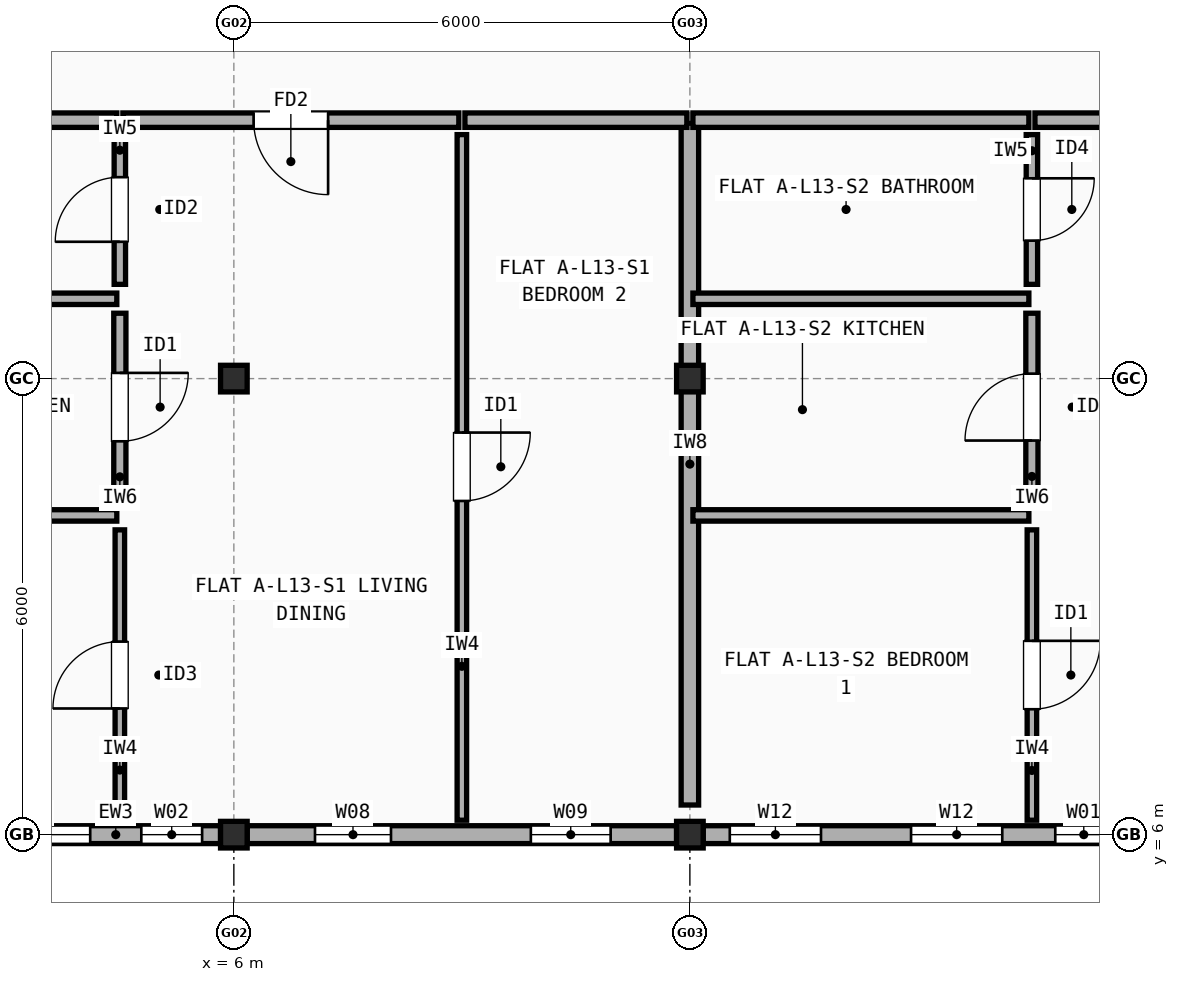
"""IFC4 building model, lengths in metres.
Left out: names, types, materials, properties, quantities, classifications, styles, units other than length and angle.
Written with IfcOpenShell. Run it as: python <this file> out.ifc"""

import sys

from ifc_helpers import new_model, si_unit, direction, frame, frame_2d, origin, origin_2d, place, context, subcontext, project, spatial, rectangle, extrude, element, fill, save


model = new_model("IFC4")
c1 = context("Model", 3, precision=1e-05, world=origin(), true_north=direction((0.0, 1.0)))
c2 = subcontext(c1, "Body", "Model", "MODEL_VIEW")
j1 = project(units=[si_unit("LENGTHUNIT", "METRE"), si_unit("PLANEANGLEUNIT", "RADIAN")], contexts=[c1])
p1 = place(None, origin())
s1 = spatial("IfcSite", under=j1, at=p1, CompositionType="ELEMENT")
p2 = place(p1, origin())
s2 = spatial("IfcBuilding", under=s1, at=p2, CompositionType="ELEMENT")
p3 = place(p2, frame((0.0, 0.0, 42.9)))
s3 = spatial("IfcBuildingStorey", under=s2, at=p3, CompositionType="ELEMENT", Elevation=42.9)
for number, where, z_axis, x_axis in (
    (1, (6.0, 6.0, 0.0), (0.0, 0.0, 1.0), (1.0, 0.0, 0.0)),
    (2, (6.0, 12.0, 0.0), (0.0, 0.0, 1.0), (1.0, 0.0, 0.0)),
    (3, (12.0, 6.0, 0.0), (0.0, 0.0, 1.0), (1.0, 0.0, 0.0)),
    (4, (12.0, 12.0, 0.0), (0.0, 0.0, 1.0), (1.0, 0.0, 0.0)),
):
    element("IfcColumn", number, at=place(p3, frame(where, z_axis=z_axis, x_axis=x_axis)), inside=s3, PredefinedType="COLUMN", context=c2, shape_type="SweptSolid", body=[
        extrude(rectangle(XDim=0.35, YDim=0.35, at=origin_2d()), origin(), (0.0, 0.0, 1.0), 3.005),
    ])
p4 = place(p3, frame((0.175, 6.0, 0.0), z_axis=(0.0, 0.0, 1.0), x_axis=(1.0, 0.0, 0.0)))
e5 = element("IfcWall", 5, at=p4, inside=s3, PredefinedType="STANDARD", context=c2, shape_type="SweptSolid", body=[
    extrude(rectangle(XDim=5.65, YDim=0.235, at=frame_2d((2.825, 0.0))), origin(), (0.0, 0.0, 1.0), 2.487),
])
p5 = place(p4, frame((0.35, 0.0, 0.9)))
e6 = element("IfcOpeningElement", 6, at=p5, cuts=e5, PredefinedType="OPENING", context=c2, shape_type="SweptSolid", body=[
    extrude(rectangle(XDim=1.5, YDim=1.4, at=frame_2d((0.75, 0.7))), frame((0.0, 0.127, 0.0), z_axis=(0.0, -1.0, 0.0), x_axis=(1.0, 0.0, 0.0)), (0.0, 0.0, 1.0), 0.255),
])
p6 = place(p4, frame((2.435, 0.0, 0.9)))
e7 = element("IfcOpeningElement", 7, at=p6, cuts=e5, PredefinedType="OPENING", context=c2, shape_type="SweptSolid", body=[
    extrude(rectangle(XDim=1.5, YDim=1.4, at=frame_2d((0.75, 0.7))), frame((0.0, 0.127, 0.0), z_axis=(0.0, -1.0, 0.0), x_axis=(1.0, 0.0, 0.0)), (0.0, 0.0, 1.0), 0.255),
])
p7 = place(p4, frame((4.607, 0.0, 0.9)))
e8 = element("IfcOpeningElement", 8, at=p7, cuts=e5, PredefinedType="OPENING", context=c2, shape_type="SweptSolid", body=[
    extrude(rectangle(XDim=0.8, YDim=1.2, at=frame_2d((0.4, 0.6))), frame((0.0, 0.127, 0.0), z_axis=(0.0, -1.0, 0.0), x_axis=(1.0, 0.0, 0.0)), (0.0, 0.0, 1.0), 0.255),
])
p8 = place(p3, frame((6.175, 6.0, 0.0), z_axis=(0.0, 0.0, 1.0), x_axis=(1.0, 0.0, 0.0)))
e9 = element("IfcWall", 9, at=p8, inside=s3, PredefinedType="STANDARD", context=c2, shape_type="SweptSolid", body=[
    extrude(rectangle(XDim=5.65, YDim=0.235, at=frame_2d((2.825, 0.0))), origin(), (0.0, 0.0, 1.0), 2.487),
])
p9 = place(p8, frame((0.893, 0.0, 0.9)))
e10 = element("IfcOpeningElement", 10, at=p9, cuts=e9, PredefinedType="OPENING", context=c2, shape_type="SweptSolid", body=[
    extrude(rectangle(XDim=1.0, YDim=1.4, at=frame_2d((0.5, 0.7))), frame((0.0, 0.127, 0.0), z_axis=(0.0, -1.0, 0.0), x_axis=(1.0, 0.0, 0.0)), (0.0, 0.0, 1.0), 0.255),
])
p10 = place(p8, frame((3.732, 0.0, 0.9)))
e11 = element("IfcOpeningElement", 11, at=p10, cuts=e9, PredefinedType="OPENING", context=c2, shape_type="SweptSolid", body=[
    extrude(rectangle(XDim=1.05, YDim=1.35, at=frame_2d((0.525, 0.675))), frame((0.0, 0.127, 0.0), z_axis=(0.0, -1.0, 0.0), x_axis=(1.0, 0.0, 0.0)), (0.0, 0.0, 1.0), 0.255),
])
p11 = place(p3, frame((12.175, 6.0, 0.0), z_axis=(0.0, 0.0, 1.0), x_axis=(1.0, 0.0, 0.0)))
e12 = element("IfcWall", 12, at=p11, inside=s3, PredefinedType="STANDARD", context=c2, shape_type="SweptSolid", body=[
    extrude(rectangle(XDim=5.65, YDim=0.235, at=frame_2d((2.825, 0.0))), origin(), (0.0, 0.0, 1.0), 2.487),
])
p12 = place(p11, frame((0.35, 0.0, 0.9)))
e13 = element("IfcOpeningElement", 13, at=p12, cuts=e12, PredefinedType="OPENING", context=c2, shape_type="SweptSolid", body=[
    extrude(rectangle(XDim=1.2, YDim=1.35, at=frame_2d((0.6, 0.675))), frame((0.0, 0.127, 0.0), z_axis=(0.0, -1.0, 0.0), x_axis=(1.0, 0.0, 0.0)), (0.0, 0.0, 1.0), 0.255),
])
p13 = place(p11, frame((2.735, 0.0, 0.9)))
e14 = element("IfcOpeningElement", 14, at=p13, cuts=e12, PredefinedType="OPENING", context=c2, shape_type="SweptSolid", body=[
    extrude(rectangle(XDim=1.2, YDim=1.35, at=frame_2d((0.6, 0.675))), frame((0.0, 0.127, 0.0), z_axis=(0.0, -1.0, 0.0), x_axis=(1.0, 0.0, 0.0)), (0.0, 0.0, 1.0), 0.255),
])
p14 = place(p11, frame((4.633, 0.0, 0.9)))
e15 = element("IfcOpeningElement", 15, at=p14, cuts=e12, PredefinedType="OPENING", context=c2, shape_type="SweptSolid", body=[
    extrude(rectangle(XDim=0.75, YDim=1.15, at=frame_2d((0.375, 0.575))), frame((0.0, 0.127, 0.0), z_axis=(0.0, -1.0, 0.0), x_axis=(1.0, 0.0, 0.0)), (0.0, 0.0, 1.0), 0.255),
])
p15 = place(p3, frame((12.0, 6.39, 0.0), z_axis=(0.0, 0.0, 1.0), x_axis=(0.0, 1.0, 0.0)))
e16 = element("IfcWall", 16, at=p15, inside=s3, PredefinedType="SOLIDWALL", context=c2, shape_type="SweptSolid", body=[
    extrude(rectangle(XDim=8.97, YDim=0.23, at=frame_2d((4.485, 0.0))), origin(), (0.0, 0.0, 1.0), 2.458),
])
p16 = place(p3, frame((0.04, 15.4, 0.0), z_axis=(0.0, 0.0, 1.0), x_axis=(1.0, 0.0, 0.0)))
e17 = element("IfcWall", 17, at=p16, inside=s3, PredefinedType="SOLIDWALL", context=c2, shape_type="SweptSolid", body=[
    extrude(rectangle(XDim=4.42, YDim=0.19, at=frame_2d((2.21, 0.0))), origin(), (0.0, 0.0, 1.0), 2.487),
])
p17 = place(p3, frame((4.54, 15.4, 0.0), z_axis=(0.0, 0.0, 1.0), x_axis=(1.0, 0.0, 0.0)))
e18 = element("IfcWall", 18, at=p17, inside=s3, PredefinedType="SOLIDWALL", context=c2, shape_type="SweptSolid", body=[
    extrude(rectangle(XDim=4.42, YDim=0.19, at=frame_2d((2.21, 0.0))), origin(), (0.0, 0.0, 1.0), 2.458),
])
p18 = place(p17, frame((1.72, 0.0, 0.0)))
e19 = element("IfcOpeningElement", 19, at=p18, cuts=e18, PredefinedType="OPENING", context=c2, shape_type="SweptSolid", body=[
    extrude(rectangle(XDim=0.98, YDim=2.15, at=frame_2d((0.49, 1.075))), frame((0.0, 0.105, 0.0), z_axis=(0.0, -1.0, 0.0), x_axis=(1.0, 0.0, 0.0)), (0.0, 0.0, 1.0), 0.21),
])
p19 = place(p3, frame((4.5, 6.19, 0.0), z_axis=(0.0, 0.0, 1.0), x_axis=(0.0, 1.0, 0.0)))
e20 = element("IfcWall", 20, at=p19, inside=s3, PredefinedType="PARTITIONING", context=c2, shape_type="SweptSolid", body=[
    extrude(rectangle(XDim=3.82, YDim=0.125, at=frame_2d((1.91, 0.0))), origin(), (0.0, 0.0, 1.0), 3.005),
])
p20 = place(p19, frame((1.47, 0.0, 0.0)))
e21 = element("IfcOpeningElement", 21, at=p20, cuts=e20, PredefinedType="OPENING", context=c2, shape_type="SweptSolid", body=[
    extrude(rectangle(XDim=0.88, YDim=2.1, at=frame_2d((0.44, 1.05))), frame((0.0, 0.073, 0.0), z_axis=(0.0, -1.0, 0.0), x_axis=(1.0, 0.0, 0.0)), (0.0, 0.0, 1.0), 0.145),
])
p21 = place(p3, frame((4.5, 10.39, 0.0), z_axis=(0.0, 0.0, 1.0), x_axis=(0.0, 1.0, 0.0)))
e22 = element("IfcWall", 22, at=p21, inside=s3, PredefinedType="PLUMBINGWALL", context=c2, shape_type="SweptSolid", body=[
    extrude(rectangle(XDim=2.47, YDim=0.16, at=frame_2d((1.235, 0.0))), origin(), (0.0, 0.0, 1.0), 2.537),
])
p22 = place(p21, frame((0.785, 0.0, 0.0)))
e23 = element("IfcOpeningElement", 23, at=p22, cuts=e22, PredefinedType="OPENING", context=c2, shape_type="SweptSolid", body=[
    extrude(rectangle(XDim=0.9, YDim=2.1, at=frame_2d((0.45, 1.05))), frame((0.0, 0.09, 0.0), z_axis=(0.0, -1.0, 0.0), x_axis=(1.0, 0.0, 0.0)), (0.0, 0.0, 1.0), 0.18),
])
p23 = place(p3, frame((4.5, 13.24, 0.0), z_axis=(0.0, 0.0, 1.0), x_axis=(0.0, 1.0, 0.0)))
e24 = element("IfcWall", 24, at=p23, inside=s3, PredefinedType="PARTITIONING", context=c2, shape_type="SweptSolid", body=[
    extrude(rectangle(XDim=1.97, YDim=0.15, at=frame_2d((0.985, 0.0))), origin(), (0.0, 0.0, 1.0), 3.005),
])
p24 = place(p23, frame((0.56, 0.0, 0.0)))
e25 = element("IfcOpeningElement", 25, at=p24, cuts=e24, PredefinedType="OPENING", context=c2, shape_type="SweptSolid", body=[
    extrude(rectangle(XDim=0.85, YDim=2.1, at=frame_2d((0.425, 1.05))), frame((0.0, 0.085, 0.0), z_axis=(0.0, -1.0, 0.0), x_axis=(1.0, 0.0, 0.0)), (0.0, 0.0, 1.0), 0.17),
])
for number, where, z_axis, x_axis in (
    (26, (0.04, 10.2, 0.0), (0.0, 0.0, 1.0), (1.0, 0.0, 0.0)),
    (27, (0.04, 13.05, 0.0), (0.0, 0.0, 1.0), (1.0, 0.0, 0.0)),
):
    element("IfcWall", number, at=place(p3, frame(where, z_axis=z_axis, x_axis=x_axis)), inside=s3, PredefinedType="PARTITIONING", context=c2, shape_type="SweptSolid", body=[
        extrude(rectangle(XDim=4.42, YDim=0.15, at=frame_2d((2.21, 0.0))), origin(), (0.0, 0.0, 1.0), 2.487),
    ])
p25 = place(p3, frame((9.04, 15.4, 0.0), z_axis=(0.0, 0.0, 1.0), x_axis=(1.0, 0.0, 0.0)))
e28 = element("IfcWall", 28, at=p25, inside=s3, PredefinedType="SOLIDWALL", context=c2, shape_type="SweptSolid", body=[
    extrude(rectangle(XDim=2.92, YDim=0.19, at=frame_2d((1.46, 0.0))), origin(), (0.0, 0.0, 1.0), 2.458),
])
p26 = place(p3, frame((9.0, 6.19, 0.0), z_axis=(0.0, 0.0, 1.0), x_axis=(0.0, 1.0, 0.0)))
e29 = element("IfcWall", 29, at=p26, inside=s3, PredefinedType="PARTITIONING", context=c2, shape_type="SweptSolid", body=[
    extrude(rectangle(XDim=9.02, YDim=0.125, at=frame_2d((4.51, 0.0))), origin(), (0.0, 0.0, 1.0), 2.537),
])
p27 = place(p26, frame((4.2, 0.0, 0.0)))
e30 = element("IfcOpeningElement", 30, at=p27, cuts=e29, PredefinedType="OPENING", context=c2, shape_type="SweptSolid", body=[
    extrude(rectangle(XDim=0.9, YDim=2.1, at=frame_2d((0.45, 1.05))), frame((0.0, 0.073, 0.0), z_axis=(0.0, -1.0, 0.0), x_axis=(1.0, 0.0, 0.0)), (0.0, 0.0, 1.0), 0.145),
])
p28 = place(p3, frame((12.04, 15.4, 0.0), z_axis=(0.0, 0.0, 1.0), x_axis=(1.0, 0.0, 0.0)))
e31 = element("IfcWall", 31, at=p28, inside=s3, PredefinedType="SOLIDWALL", context=c2, shape_type="SweptSolid", body=[
    extrude(rectangle(XDim=4.42, YDim=0.19, at=frame_2d((2.21, 0.0))), origin(), (0.0, 0.0, 1.0), 2.458),
])
p29 = place(p3, frame((16.54, 15.4, 0.0), z_axis=(0.0, 0.0, 1.0), x_axis=(1.0, 0.0, 0.0)))
e32 = element("IfcWall", 32, at=p29, inside=s3, PredefinedType="SOLIDWALL", context=c2, shape_type="SweptSolid", body=[
    extrude(rectangle(XDim=5.92, YDim=0.19, at=frame_2d((2.96, 0.0))), origin(), (0.0, 0.0, 1.0), 2.548),
])
p30 = place(p29, frame((2.46, 0.0, 0.0)))
e33 = element("IfcOpeningElement", 33, at=p30, cuts=e32, PredefinedType="OPENING", context=c2, shape_type="SweptSolid", body=[
    extrude(rectangle(XDim=1.0, YDim=2.15, at=frame_2d((0.5, 1.075))), frame((0.0, 0.105, 0.0), z_axis=(0.0, -1.0, 0.0), x_axis=(1.0, 0.0, 0.0)), (0.0, 0.0, 1.0), 0.21),
])
p31 = place(p3, frame((16.5, 6.19, 0.0), z_axis=(0.0, 0.0, 1.0), x_axis=(0.0, 1.0, 0.0)))
e34 = element("IfcWall", 34, at=p31, inside=s3, PredefinedType="PARTITIONING", context=c2, shape_type="SweptSolid", body=[
    extrude(rectangle(XDim=3.82, YDim=0.125, at=frame_2d((1.91, 0.0))), origin(), (0.0, 0.0, 1.0), 3.005),
])
p32 = place(p31, frame((1.46, 0.0, 0.0)))
e35 = element("IfcOpeningElement", 35, at=p32, cuts=e34, PredefinedType="OPENING", context=c2, shape_type="SweptSolid", body=[
    extrude(rectangle(XDim=0.9, YDim=2.1, at=frame_2d((0.45, 1.05))), frame((0.0, 0.073, 0.0), z_axis=(0.0, -1.0, 0.0), x_axis=(1.0, 0.0, 0.0)), (0.0, 0.0, 1.0), 0.145),
])
p33 = place(p3, frame((16.5, 10.39, 0.0), z_axis=(0.0, 0.0, 1.0), x_axis=(0.0, 1.0, 0.0)))
e36 = element("IfcWall", 36, at=p33, inside=s3, PredefinedType="PLUMBINGWALL", context=c2, shape_type="SweptSolid", body=[
    extrude(rectangle(XDim=2.47, YDim=0.16, at=frame_2d((1.235, 0.0))), origin(), (0.0, 0.0, 1.0), 2.537),
])
p34 = place(p33, frame((0.795, 0.0, 0.0)))
e37 = element("IfcOpeningElement", 37, at=p34, cuts=e36, PredefinedType="OPENING", context=c2, shape_type="SweptSolid", body=[
    extrude(rectangle(XDim=0.88, YDim=2.1, at=frame_2d((0.44, 1.05))), frame((0.0, 0.09, 0.0), z_axis=(0.0, -1.0, 0.0), x_axis=(1.0, 0.0, 0.0)), (0.0, 0.0, 1.0), 0.18),
])
p35 = place(p3, frame((16.5, 13.24, 0.0), z_axis=(0.0, 0.0, 1.0), x_axis=(0.0, 1.0, 0.0)))
e38 = element("IfcWall", 38, at=p35, inside=s3, PredefinedType="PARTITIONING", context=c2, shape_type="SweptSolid", body=[
    extrude(rectangle(XDim=1.97, YDim=0.15, at=frame_2d((0.985, 0.0))), origin(), (0.0, 0.0, 1.0), 3.005),
])
p36 = place(p35, frame((0.575, 0.0, 0.0)))
e39 = element("IfcOpeningElement", 39, at=p36, cuts=e38, PredefinedType="OPENING", context=c2, shape_type="SweptSolid", body=[
    extrude(rectangle(XDim=0.82, YDim=2.08, at=frame_2d((0.41, 1.04))), frame((0.0, 0.085, 0.0), z_axis=(0.0, -1.0, 0.0), x_axis=(1.0, 0.0, 0.0)), (0.0, 0.0, 1.0), 0.17),
])
p37 = place(p3, frame((12.04, 10.2, 0.0), z_axis=(0.0, 0.0, 1.0), x_axis=(1.0, 0.0, 0.0)))
e40 = element("IfcWall", 40, at=p37, inside=s3, PredefinedType="PARTITIONING", context=c2, shape_type="SweptSolid", body=[
    extrude(rectangle(XDim=4.42, YDim=0.15, at=frame_2d((2.21, 0.0))), origin(), (0.0, 0.0, 1.0), 2.508),
])
p38 = place(p3, frame((12.04, 13.05, 0.0), z_axis=(0.0, 0.0, 1.0), x_axis=(1.0, 0.0, 0.0)))
e41 = element("IfcWall", 41, at=p38, inside=s3, PredefinedType="PARTITIONING", context=c2, shape_type="SweptSolid", body=[
    extrude(rectangle(XDim=4.42, YDim=0.15, at=frame_2d((2.21, 0.0))), origin(), (0.0, 0.0, 1.0), 2.458),
])
p39 = place(p6, origin())
e42 = element("IfcWindow", 42, at=p39, inside=s3, PartitioningType="SINGLE_PANEL", PredefinedType="WINDOW", context=c2, shape_type="SweptSolid", body=[
    extrude(rectangle(XDim=1.5, YDim=1.4, at=frame_2d((0.75, 0.7))), frame((0.0, 0.03, 0.0), z_axis=(0.0, -1.0, 0.0), x_axis=(1.0, 0.0, 0.0)), (0.0, 0.0, 1.0), 0.06),
])
fill(e7, e42)
p40 = place(p7, origin())
e43 = element("IfcWindow", 43, at=p40, inside=s3, PartitioningType="SINGLE_PANEL", PredefinedType="WINDOW", context=c2, shape_type="SweptSolid", body=[
    extrude(rectangle(XDim=0.8, YDim=1.2, at=frame_2d((0.4, 0.6))), frame((0.0, 0.03, 0.0), z_axis=(0.0, -1.0, 0.0), x_axis=(1.0, 0.0, 0.0)), (0.0, 0.0, 1.0), 0.06),
])
fill(e8, e43)
p41 = place(p9, origin())
e44 = element("IfcWindow", 44, at=p41, inside=s3, PartitioningType="SINGLE_PANEL", PredefinedType="WINDOW", context=c2, shape_type="SweptSolid", body=[
    extrude(rectangle(XDim=1.0, YDim=1.4, at=frame_2d((0.5, 0.7))), frame((0.0, 0.03, 0.0), z_axis=(0.0, -1.0, 0.0), x_axis=(1.0, 0.0, 0.0)), (0.0, 0.0, 1.0), 0.06),
])
fill(e10, e44)
p42 = place(p10, origin())
e45 = element("IfcWindow", 45, at=p42, inside=s3, PartitioningType="SINGLE_PANEL", PredefinedType="WINDOW", context=c2, shape_type="SweptSolid", body=[
    extrude(rectangle(XDim=1.05, YDim=1.35, at=frame_2d((0.525, 0.675))), frame((0.0, 0.03, 0.0), z_axis=(0.0, -1.0, 0.0), x_axis=(1.0, 0.0, 0.0)), (0.0, 0.0, 1.0), 0.06),
])
fill(e11, e45)
p43 = place(p12, origin())
e46 = element("IfcWindow", 46, at=p43, inside=s3, PartitioningType="SINGLE_PANEL", PredefinedType="WINDOW", context=c2, shape_type="SweptSolid", body=[
    extrude(rectangle(XDim=1.2, YDim=1.35, at=frame_2d((0.6, 0.675))), frame((0.0, 0.03, 0.0), z_axis=(0.0, -1.0, 0.0), x_axis=(1.0, 0.0, 0.0)), (0.0, 0.0, 1.0), 0.06),
])
fill(e13, e46)
p44 = place(p13, origin())
e47 = element("IfcWindow", 47, at=p44, inside=s3, PartitioningType="SINGLE_PANEL", PredefinedType="WINDOW", context=c2, shape_type="SweptSolid", body=[
    extrude(rectangle(XDim=1.2, YDim=1.35, at=frame_2d((0.6, 0.675))), frame((0.0, 0.03, 0.0), z_axis=(0.0, -1.0, 0.0), x_axis=(1.0, 0.0, 0.0)), (0.0, 0.0, 1.0), 0.06),
])
fill(e14, e47)
p45 = place(p14, origin())
e48 = element("IfcWindow", 48, at=p45, inside=s3, PartitioningType="SINGLE_PANEL", PredefinedType="WINDOW", context=c2, shape_type="SweptSolid", body=[
    extrude(rectangle(XDim=0.75, YDim=1.15, at=frame_2d((0.375, 0.575))), frame((0.0, 0.03, 0.0), z_axis=(0.0, -1.0, 0.0), x_axis=(1.0, 0.0, 0.0)), (0.0, 0.0, 1.0), 0.06),
])
fill(e15, e48)
p46 = place(p18, origin())
e49 = element("IfcDoor", 49, at=p46, inside=s3, OperationType="SINGLE_SWING_RIGHT", PredefinedType="DOOR", context=c2, shape_type="SweptSolid", body=[
    extrude(rectangle(XDim=0.98, YDim=2.15, at=frame_2d((0.49, 1.075))), frame((0.0, 0.025, 0.0), z_axis=(0.0, -1.0, 0.0), x_axis=(1.0, 0.0, 0.0)), (0.0, 0.0, 1.0), 0.05),
])
fill(e19, e49)
p47 = place(p20, origin())
e50 = element("IfcDoor", 50, at=p47, inside=s3, OperationType="SINGLE_SWING_LEFT", PredefinedType="DOOR", context=c2, shape_type="SweptSolid", body=[
    extrude(rectangle(XDim=0.88, YDim=2.1, at=frame_2d((0.44, 1.05))), frame((0.0, 0.025, 0.0), z_axis=(0.0, -1.0, 0.0), x_axis=(1.0, 0.0, 0.0)), (0.0, 0.0, 1.0), 0.05),
])
fill(e21, e50)
p48 = place(p22, origin())
e51 = element("IfcDoor", 51, at=p48, inside=s3, OperationType="SINGLE_SWING_RIGHT", PredefinedType="DOOR", context=c2, shape_type="SweptSolid", body=[
    extrude(rectangle(XDim=0.9, YDim=2.1, at=frame_2d((0.45, 1.05))), frame((0.0, 0.025, 0.0), z_axis=(0.0, -1.0, 0.0), x_axis=(1.0, 0.0, 0.0)), (0.0, 0.0, 1.0), 0.05),
])
fill(e23, e51)
p49 = place(p24, origin())
e52 = element("IfcDoor", 52, at=p49, inside=s3, OperationType="SINGLE_SWING_LEFT", PredefinedType="DOOR", context=c2, shape_type="SweptSolid", body=[
    extrude(rectangle(XDim=0.85, YDim=2.1, at=frame_2d((0.425, 1.05))), frame((0.0, 0.025, 0.0), z_axis=(0.0, -1.0, 0.0), x_axis=(1.0, 0.0, 0.0)), (0.0, 0.0, 1.0), 0.05),
])
fill(e25, e52)
p50 = place(p27, origin())
e53 = element("IfcDoor", 53, at=p50, inside=s3, OperationType="SINGLE_SWING_RIGHT", PredefinedType="DOOR", context=c2, shape_type="SweptSolid", body=[
    extrude(rectangle(XDim=0.9, YDim=2.1, at=frame_2d((0.45, 1.05))), frame((0.0, 0.025, 0.0), z_axis=(0.0, -1.0, 0.0), x_axis=(1.0, 0.0, 0.0)), (0.0, 0.0, 1.0), 0.05),
])
fill(e30, e53)
p51 = place(p32, origin())
e54 = element("IfcDoor", 54, at=p51, inside=s3, OperationType="SINGLE_SWING_RIGHT", PredefinedType="DOOR", context=c2, shape_type="SweptSolid", body=[
    extrude(rectangle(XDim=0.9, YDim=2.1, at=frame_2d((0.45, 1.05))), frame((0.0, 0.025, 0.0), z_axis=(0.0, -1.0, 0.0), x_axis=(1.0, 0.0, 0.0)), (0.0, 0.0, 1.0), 0.05),
])
fill(e35, e54)
p52 = place(p34, origin())
e55 = element("IfcDoor", 55, at=p52, inside=s3, OperationType="SINGLE_SWING_LEFT", PredefinedType="DOOR", context=c2, shape_type="SweptSolid", body=[
    extrude(rectangle(XDim=0.88, YDim=2.1, at=frame_2d((0.44, 1.05))), frame((0.0, 0.025, 0.0), z_axis=(0.0, -1.0, 0.0), x_axis=(1.0, 0.0, 0.0)), (0.0, 0.0, 1.0), 0.05),
])
fill(e37, e55)
p53 = place(p36, origin())
e56 = element("IfcDoor", 56, at=p53, inside=s3, OperationType="SINGLE_SWING_RIGHT", PredefinedType="DOOR", context=c2, shape_type="SweptSolid", body=[
    extrude(rectangle(XDim=0.82, YDim=2.08, at=frame_2d((0.41, 1.04))), frame((0.0, 0.025, 0.0), z_axis=(0.0, -1.0, 0.0), x_axis=(1.0, 0.0, 0.0)), (0.0, 0.0, 1.0), 0.05),
])
fill(e39, e56)
save(model, sys.argv[1])
